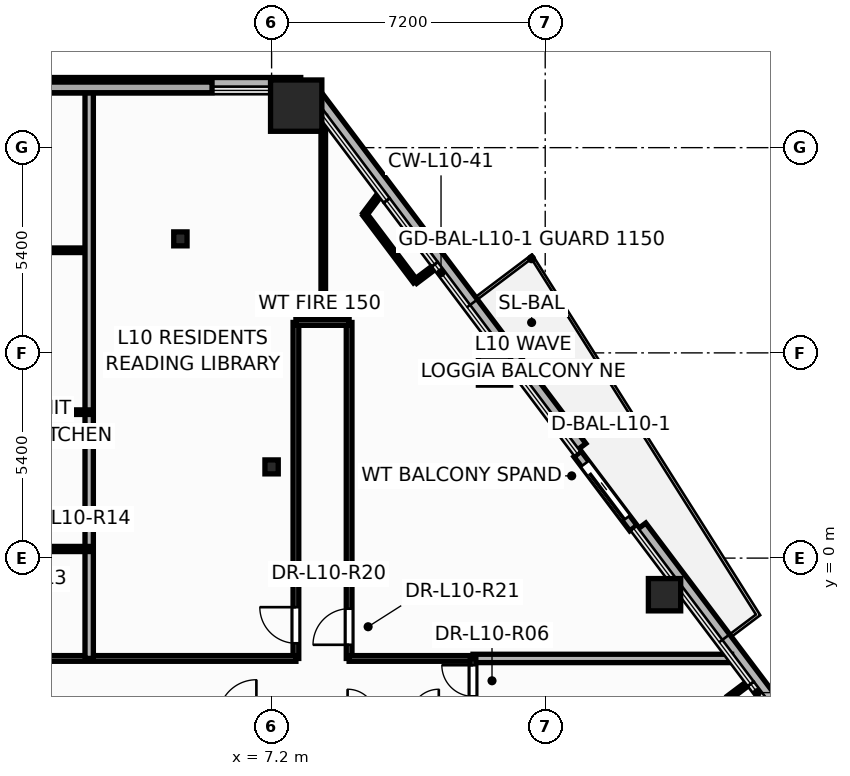
"""IFC4 building model, lengths in metres.
Left out: names, types, materials, properties, quantities, classifications, styles, units other than length and angle.
Written with IfcOpenShell. Run it as: python <this file> out.ifc"""

import sys

from ifc_helpers import new_model, si_unit, direction, frame, frame_2d, origin, origin_2d, place, context, subcontext, project, spatial, rectangle, hollow_rectangle, hollow_circle, i_section, extrude, element, fill, save


model = new_model("IFC4")
c1 = context("Model", 3, precision=1e-05, world=origin(), true_north=direction((0.0, 1.0)))
c2 = subcontext(c1, "Body", "Model", "MODEL_VIEW")
j1 = project(units=[si_unit("LENGTHUNIT", "METRE"), si_unit("PLANEANGLEUNIT", "RADIAN")], contexts=[c1])
p1 = place(None, origin())
s1 = spatial("IfcSite", under=j1, at=p1, CompositionType="ELEMENT")
p2 = place(p1, origin())
s2 = spatial("IfcBuilding", under=s1, at=p2, CompositionType="ELEMENT")
p3 = place(p2, frame((0.0, 0.0, 42.3)))
s3 = spatial("IfcBuildingStorey", under=s2, at=p3, CompositionType="ELEMENT", Elevation=42.3)
p4 = place(p3, frame((7.847, 11.906, 0.0), z_axis=(0.0, 0.0, 1.0), x_axis=(1.0, 0.0, 0.0)))
e1 = element("IfcColumn", 1, at=p4, inside=s3, PredefinedType="COLUMN", context=c2, shape_type="SweptSolid", body=[
    extrude(hollow_rectangle(XDim=1.35, YDim=1.35, WallThickness=0.065, at=origin_2d()), origin(), (0.0, 0.0, 1.0), 3.6),
])
for number, where, z_axis, x_axis in (
    (2, (17.54, -0.963, 0.0), (0.0, 0.0, 1.0), (1.0, 0.0, 0.0)),
    (3, (13.066, 4.976, 0.0), (0.0, 0.0, 1.0), (1.0, 0.0, 0.0)),
):
    element("IfcColumn", number, at=place(p3, frame(where, z_axis=z_axis, x_axis=x_axis)), inside=s3, PredefinedType="COLUMN", context=c2, shape_type="SweptSolid", body=[
        extrude(hollow_circle(Radius=0.425, WallThickness=0.038, at=origin_2d()), origin(), (0.0, 0.0, 1.0), 3.6),
    ])
for number, where, z_axis, x_axis in (
    (4, (7.2, 2.4, 0.0), (0.0, 0.0, 1.0), (1.0, 0.0, 0.0)),
    (5, (4.8, 8.4, 0.0), (0.0, 0.0, 1.0), (1.0, 0.0, 0.0)),
):
    element("IfcColumn", number, at=place(p3, frame(where, z_axis=z_axis, x_axis=x_axis)), inside=s3, PredefinedType="COLUMN", context=c2, shape_type="SweptSolid", body=[
        extrude(i_section(OverallWidth=0.35, OverallDepth=0.367, WebThickness=0.025, FlangeThickness=0.032, at=origin_2d()), origin(), (0.0, 0.0, 1.0), 3.6),
    ])
p5 = place(p3, frame((23.315, -7.7, -0.2), z_axis=(0.0, 0.0, 1.0), x_axis=(-0.601640427837, 0.798767047137, 0.0)))
e6 = element("IfcWall", 6, at=p5, inside=s3, PredefinedType="PARAPET", context=c2, shape_type="SweptSolid", body=[
    extrude(rectangle(XDim=10.66, YDim=0.36, at=frame_2d((5.33, 0.0))), origin(), (0.0, 0.0, 1.0), 0.38),
])
p6 = place(p3, frame((15.326, 2.907, -0.2), z_axis=(0.0, 0.0, 1.0), x_axis=(-0.601625447282, 0.798778330441, 0.0)))
e7 = element("IfcWall", 7, at=p6, inside=s3, PredefinedType="PARAPET", context=c2, shape_type="SweptSolid", body=[
    extrude(rectangle(XDim=11.767, YDim=0.36, at=frame_2d((5.883, 0.0))), origin(), (0.0, 0.0, 1.0), 0.38),
])
p7 = place(p3, frame((7.967, 12.466, -0.2), z_axis=(0.0, 0.0, 1.0), x_axis=(-1.0, 0.0, 0.0)))
e8 = element("IfcWall", 8, at=p7, inside=s3, PredefinedType="PARAPET", context=c2, shape_type="SweptSolid", body=[
    extrude(rectangle(XDim=15.934, YDim=0.36, at=frame_2d((7.967, 0.0))), origin(), (0.0, 0.0, 1.0), 0.38),
])
p8 = place(p3, frame((16.72, 0.79, -0.015), z_axis=(0.0, 0.0, 1.0), x_axis=(-0.601647678338, 0.798761585926, 0.0)))
e9 = element("IfcWall", 9, at=p8, inside=s3, PredefinedType="STANDARD", context=c2, shape_type="SweptSolid", body=[
    extrude(rectangle(XDim=2.44, YDim=0.24, at=frame_2d((1.22, 0.0))), origin(), (0.0, 0.0, 1.0), 2.729),
])
p9 = place(p8, frame((0.32, 0.0, 0.015)))
e10 = element("IfcOpeningElement", 10, at=p9, cuts=e9, PredefinedType="OPENING", context=c2, shape_type="SweptSolid", body=[
    extrude(rectangle(XDim=1.806, YDim=2.204, at=frame_2d((0.9, 1.102))), frame((0.0, 0.13, 0.0), z_axis=(0.0, -1.0, 0.0), x_axis=(1.0, 0.0, 0.0)), (0.0, 0.0, 1.0), 0.26),
])
p10 = place(p3, frame((7.84, -2.64, 0.0), z_axis=(0.0, 0.0, 1.0), x_axis=(0.0, 1.0, 0.0)))
e11 = element("IfcWall", 11, at=p10, inside=s3, PredefinedType="PARTITIONING", context=c2, shape_type="SweptSolid", body=[
    extrude(rectangle(XDim=8.84, YDim=0.15, at=frame_2d((4.42, 0.0))), origin(), (0.0, 0.0, 1.0), 2.509),
])
p11 = place(p10, frame((0.399, 0.0, 0.0)))
e12 = element("IfcOpeningElement", 12, at=p11, cuts=e11, PredefinedType="OPENING", context=c2, shape_type="SweptSolid", body=[
    extrude(rectangle(XDim=0.956, YDim=2.104, at=frame_2d((0.475, 1.052))), frame((0.0, 0.085, 0.0), z_axis=(0.0, -1.0, 0.0), x_axis=(1.0, 0.0, 0.0)), (0.0, 0.0, 1.0), 0.17),
])
p12 = place(p3, frame((9.24, -2.64, 0.0), z_axis=(0.0, 0.0, 1.0), x_axis=(0.0, 1.0, 0.0)))
e13 = element("IfcWall", 13, at=p12, inside=s3, PredefinedType="PARTITIONING", context=c2, shape_type="SweptSolid", body=[
    extrude(rectangle(XDim=8.84, YDim=0.15, at=frame_2d((4.42, 0.0))), origin(), (0.0, 0.0, 1.0), 2.509),
])
p13 = place(p12, frame((0.359, 0.0, 0.0)))
e14 = element("IfcOpeningElement", 14, at=p13, cuts=e13, PredefinedType="OPENING", context=c2, shape_type="SweptSolid", body=[
    extrude(rectangle(XDim=0.956, YDim=2.104, at=frame_2d((0.475, 1.052))), frame((0.0, 0.085, 0.0), z_axis=(0.0, -1.0, 0.0), x_axis=(1.0, 0.0, 0.0)), (0.0, 0.0, 1.0), 0.17),
])
p14 = place(p3, frame((12.5, -2.64, 0.0), z_axis=(0.0, 0.0, 1.0), x_axis=(1.0, 0.0, 0.0)))
e15 = element("IfcWall", 15, at=p14, inside=s3, PredefinedType="PARTITIONING", context=c2, shape_type="SweptSolid", body=[
    extrude(rectangle(XDim=6.804, YDim=0.22, at=frame_2d((3.402, 0.0))), origin(), (0.0, 0.0, 1.0), 2.713),
])
p15 = place(p3, frame((-3.4, 8.1, 0.0), z_axis=(0.0, 0.0, 1.0), x_axis=(1.0, 0.0, 0.0)))
e16 = element("IfcWall", 16, at=p15, inside=s3, PredefinedType="PARTITIONING", context=c2, shape_type="SweptSolid", body=[
    extrude(rectangle(XDim=5.8, YDim=0.12, at=frame_2d((2.9, 0.0))), origin(), (0.0, 0.0, 1.0), 2.325),
])
p16 = place(p15, frame((0.52, 0.0, 0.0)))
e17 = element("IfcOpeningElement", 17, at=p16, cuts=e16, PredefinedType="OPENING", context=c2, shape_type="SweptSolid", body=[
    extrude(rectangle(XDim=0.926, YDim=2.104, at=frame_2d((0.46, 1.052))), frame((0.0, 0.07, 0.0), z_axis=(0.0, -1.0, 0.0), x_axis=(1.0, 0.0, 0.0)), (0.0, 0.0, 1.0), 0.14),
])
p17 = place(p3, frame((-0.138, -2.64, 0.0), z_axis=(0.0, 0.0, 1.0), x_axis=(1.0, 0.0, 0.0)))
e18 = element("IfcWall", 18, at=p17, inside=s3, PredefinedType="PARTITIONING", context=c2, shape_type="SweptSolid", body=[
    extrude(rectangle(XDim=7.978, YDim=0.15, at=frame_2d((3.989, 0.0))), origin(), (0.0, 0.0, 1.0), 2.325),
])
p18 = place(p3, frame((8.56, 6.2, 0.0), z_axis=(0.0, 0.0, 1.0), x_axis=(0.0, 1.0, 0.0)))
e19 = element("IfcWall", 19, at=p18, inside=s3, PredefinedType="PARTITIONING", context=c2, shape_type="SweptSolid", body=[
    extrude(rectangle(XDim=5.425, YDim=0.12, at=frame_2d((2.712, 0.0))), origin(), (0.0, 0.0, 1.0), 2.509),
])
p19 = place(p3, frame((2.4, -2.64, 0.0), z_axis=(0.0, 0.0, 1.0), x_axis=(0.0, 1.0, 0.0)))
e20 = element("IfcWall", 20, at=p19, inside=s3, PredefinedType="PARTITIONING", context=c2, shape_type="SweptSolid", body=[
    extrude(rectangle(XDim=14.946, YDim=0.22, at=frame_2d((7.473, 0.0))), origin(), (0.0, 0.0, 1.0), 2.325),
])
p20 = place(p3, frame((9.24, -2.64, 0.0), z_axis=(0.0, 0.0, 1.0), x_axis=(1.0, 0.0, 0.0)))
e21 = element("IfcWall", 21, at=p20, inside=s3, PredefinedType="PARTITIONING", context=c2, shape_type="SweptSolid", body=[
    extrude(rectangle(XDim=3.26, YDim=0.15, at=frame_2d((1.63, 0.0))), origin(), (0.0, 0.0, 1.0), 3.35),
])
p21 = place(p3, frame((-0.2, 0.24, 0.0), z_axis=(0.0, 0.0, 1.0), x_axis=(1.0, 0.0, 0.0)))
e22 = element("IfcWall", 22, at=p21, inside=s3, PredefinedType="PARTITIONING", context=c2, shape_type="SweptSolid", body=[
    extrude(rectangle(XDim=2.6, YDim=0.135, at=frame_2d((1.3, 0.0))), origin(), (0.0, 0.0, 1.0), 2.325),
])
p22 = place(p3, frame((-0.2, 3.84, 0.0), z_axis=(0.0, 0.0, 1.0), x_axis=(1.0, 0.0, 0.0)))
e23 = element("IfcWall", 23, at=p22, inside=s3, PredefinedType="PARTITIONING", context=c2, shape_type="SweptSolid", body=[
    extrude(rectangle(XDim=2.6, YDim=0.12, at=frame_2d((1.3, 0.0))), origin(), (0.0, 0.0, 1.0), 2.325),
])
p23 = place(p3, frame((10.983, 7.277, 0.0), z_axis=(0.0, 0.0, 1.0), x_axis=(-0.60167490335, 0.798741078622, 0.0)))
e24 = element("IfcWall", 24, at=p23, inside=s3, PredefinedType="PARTITIONING", context=c2, shape_type="SweptSolid", body=[
    extrude(rectangle(XDim=2.214, YDim=0.12, at=frame_2d((1.107, 0.0))), origin(), (0.0, 0.0, 1.0), 3.35),
])
p24 = place(p3, frame((12.5, -4.24, 0.0), z_axis=(0.0, 0.0, 1.0), x_axis=(0.0, 1.0, 0.0)))
e25 = element("IfcWall", 25, at=p24, inside=s3, PredefinedType="PARTITIONING", context=c2, shape_type="SweptSolid", body=[
    extrude(rectangle(XDim=1.6, YDim=0.15, at=frame_2d((0.8, 0.0))), origin(), (0.0, 0.0, 1.0), 2.325),
])
p25 = place(p24, frame((0.602, 0.0, 0.0)))
e26 = element("IfcOpeningElement", 26, at=p25, cuts=e25, PredefinedType="OPENING", context=c2, shape_type="SweptSolid", body=[
    extrude(rectangle(XDim=0.826, YDim=2.104, at=frame_2d((0.41, 1.052))), frame((0.0, 0.085, 0.0), z_axis=(0.0, -1.0, 0.0), x_axis=(1.0, 0.0, 0.0)), (0.0, 0.0, 1.0), 0.17),
])
p26 = place(p3, frame((7.84, 6.2, 0.0), z_axis=(0.0, 0.0, 1.0), x_axis=(1.0, 0.0, 0.0)))
e27 = element("IfcWall", 27, at=p26, inside=s3, PredefinedType="PARTITIONING", context=c2, shape_type="SweptSolid", body=[
    extrude(rectangle(XDim=1.4, YDim=0.15, at=frame_2d((0.7, 0.0))), origin(), (0.0, 0.0, 1.0), 3.35),
])
p27 = place(p3, frame((9.651, 9.046, 0.0), z_axis=(0.0, 0.0, 1.0), x_axis=(0.601455382011, 0.79890639217, 0.0)))
e28 = element("IfcWall", 28, at=p27, inside=s3, PredefinedType="PARTITIONING", context=c2, shape_type="SweptSolid", body=[
    extrude(rectangle(XDim=0.697, YDim=0.12, at=frame_2d((0.349, 0.0))), origin(), (0.0, 0.0, 1.0), 2.713),
])
p28 = place(p3, frame((11.518, 7.68, 0.0), z_axis=(0.0, 0.0, 1.0), x_axis=(-0.798773936271, -0.601631281379, 0.0)))
e29 = element("IfcWall", 29, at=p28, inside=s3, PredefinedType="PARTITIONING", context=c2, shape_type="SweptSolid", body=[
    extrude(rectangle(XDim=0.67, YDim=0.12, at=frame_2d((0.335, 0.0))), origin(), (0.0, 0.0, 1.0), 2.713),
])
p29 = place(p3, frame((19.231, -3.674, 0.0), z_axis=(0.0, 0.0, 1.0), x_axis=(0.798905778506, 0.601456197133, 0.0)))
e30 = element("IfcWall", 30, at=p29, inside=s3, PredefinedType="PARTITIONING", context=c2, shape_type="SweptSolid", body=[
    extrude(rectangle(XDim=0.67, YDim=0.12, at=frame_2d((0.335, 0.0))), origin(), (0.0, 0.0, 1.0), 2.713),
])
p30 = place(p9, origin())
e31 = element("IfcDoor", 31, at=p30, inside=s3, OperationType="SLIDING_TO_LEFT", PredefinedType="DOOR", context=c2, shape_type="SweptSolid", body=[
    extrude(rectangle(XDim=1.8, YDim=2.2, at=frame_2d((0.9, 1.1))), frame((0.0, 0.025, 0.0), z_axis=(0.0, -1.0, 0.0), x_axis=(1.0, 0.0, 0.0)), (0.0, 0.0, 1.0), 0.05),
])
fill(e10, e31)
p31 = place(p25, origin())
e32 = element("IfcDoor", 32, at=p31, inside=s3, OperationType="SINGLE_SWING_RIGHT", PredefinedType="DOOR", context=c2, shape_type="SweptSolid", body=[
    extrude(rectangle(XDim=0.82, YDim=2.1, at=frame_2d((0.41, 1.05))), frame((0.0, 0.025, 0.0), z_axis=(0.0, -1.0, 0.0), x_axis=(1.0, 0.0, 0.0)), (0.0, 0.0, 1.0), 0.05),
])
fill(e26, e32)
p32 = place(p11, origin())
e33 = element("IfcDoor", 33, at=p32, inside=s3, OperationType="SINGLE_SWING_RIGHT", PredefinedType="DOOR", context=c2, shape_type="SweptSolid", body=[
    extrude(rectangle(XDim=0.95, YDim=2.1, at=frame_2d((0.475, 1.05))), frame((0.0, 0.025, 0.0), z_axis=(0.0, -1.0, 0.0), x_axis=(1.0, 0.0, 0.0)), (0.0, 0.0, 1.0), 0.05),
])
fill(e12, e33)
p33 = place(p13, origin())
e34 = element("IfcDoor", 34, at=p33, inside=s3, OperationType="SINGLE_SWING_LEFT", PredefinedType="DOOR", context=c2, shape_type="SweptSolid", body=[
    extrude(rectangle(XDim=0.95, YDim=2.1, at=frame_2d((0.475, 1.05))), frame((0.0, 0.025, 0.0), z_axis=(0.0, -1.0, 0.0), x_axis=(1.0, 0.0, 0.0)), (0.0, 0.0, 1.0), 0.05),
])
fill(e14, e34)
save(model, sys.argv[1])
